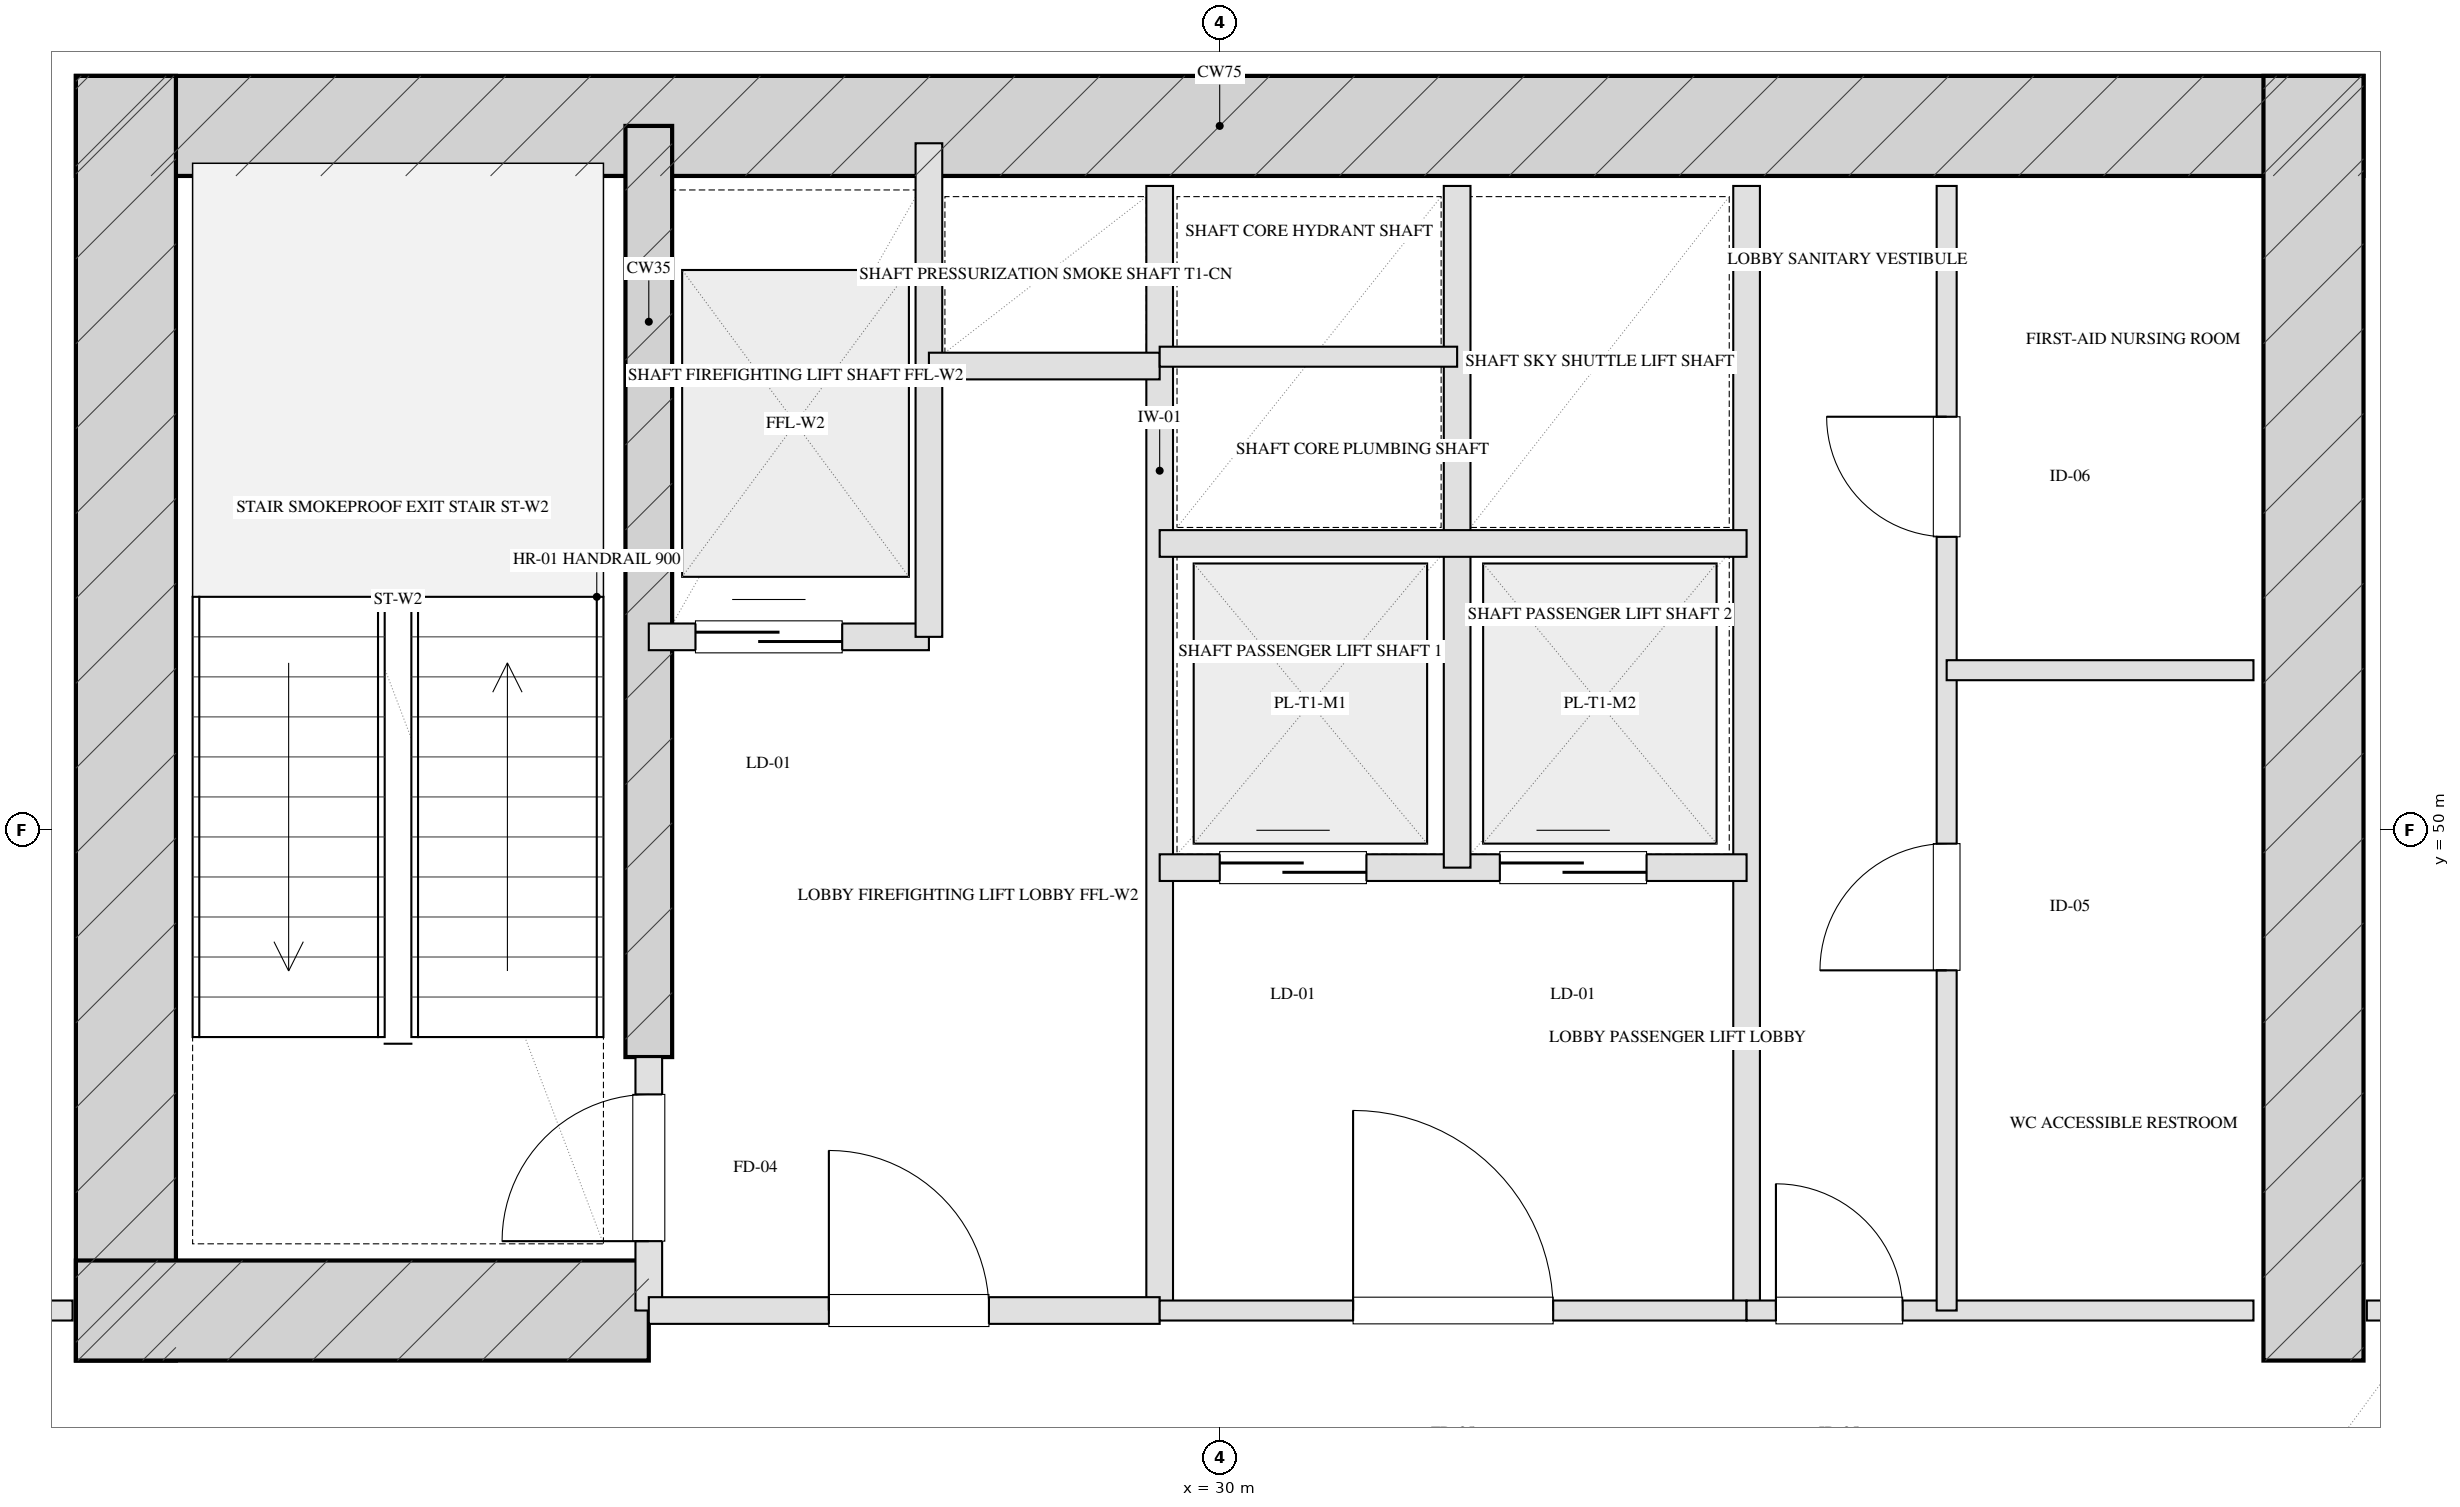
"""IFC4 building model, lengths in metres.
Left out: names, types, materials, properties, quantities, classifications, styles, units other than length and angle.
Written with IfcOpenShell. Run it as: python <this file> out.ifc"""

import sys

from ifc_helpers import new_model, si_unit, direction, frame, frame_2d, origin, place, context, subcontext, project, spatial, rectangle, extrude, element, fill, save


model = new_model("IFC4")
c1 = context("Model", 3, precision=1e-05, world=origin(), true_north=direction((0.0, 1.0)))
c2 = subcontext(c1, "Body", "Model", "MODEL_VIEW")
j1 = project(units=[si_unit("LENGTHUNIT", "METRE"), si_unit("PLANEANGLEUNIT", "RADIAN")], contexts=[c1])
p1 = place(None, origin())
s1 = spatial("IfcSite", under=j1, at=p1, CompositionType="ELEMENT")
p2 = place(p1, origin())
s2 = spatial("IfcBuilding", under=s1, at=p2, CompositionType="ELEMENT")
p3 = place(p2, frame((0.0, 0.0, 26.0)))
s3 = spatial("IfcBuildingStorey", under=s2, at=p3, CompositionType="ELEMENT", Elevation=26.0)
p4 = place(p3, frame((21.425, 55.28, 0.0), z_axis=(0.0, 0.0, 1.0), x_axis=(1.0, 0.0, 0.0)))
e1 = element("IfcWall", 1, at=p4, inside=s3, PredefinedType="SHEAR", context=c2, shape_type="SweptSolid", body=[
    extrude(rectangle(XDim=17.15, YDim=0.75, at=frame_2d((8.575, 0.0))), origin(), (0.0, 0.0, 1.0), 4.0),
])
for number, where, z_axis, x_axis in (
    (2, (21.8, 46.025, 0.0), (0.0, 0.0, 1.0), (0.0, 1.0, 0.0)),
    (3, (38.2, 46.025, 0.0), (0.0, 0.0, 1.0), (0.0, 1.0, 0.0)),
):
    element("IfcWall", number, at=place(p3, frame(where, z_axis=z_axis, x_axis=x_axis)), inside=s3, PredefinedType="SHEAR", context=c2, shape_type="SweptSolid", body=[
        extrude(rectangle(XDim=9.63, YDim=0.75, at=frame_2d((4.815, 0.0))), origin(), (0.0, 0.0, 1.0), 4.0),
    ])
p5 = place(p3, frame((25.72, 48.3, 0.0), z_axis=(0.0, 0.0, 1.0), x_axis=(0.0, 1.0, 0.0)))
e4 = element("IfcWall", 4, at=p5, inside=s3, PredefinedType="SHEAR", context=c2, shape_type="SweptSolid", body=[
    extrude(rectangle(XDim=6.98, YDim=0.35, at=frame_2d((3.49, 0.0))), origin(), (0.0, 0.0, 1.0), 4.0),
])
p6 = place(p3, frame((21.425, 46.4, 0.0), z_axis=(0.0, 0.0, 1.0), x_axis=(1.0, 0.0, 0.0)))
e5 = element("IfcWall", 5, at=p6, inside=s3, PredefinedType="SHEAR", context=c2, shape_type="SweptSolid", body=[
    extrude(rectangle(XDim=4.295, YDim=0.75, at=frame_2d((2.147, 0.0))), origin(), (0.0, 0.0, 1.0), 4.0),
])
p7 = place(p3, frame((25.72, 46.4, 0.0), z_axis=(0.0, 0.0, 1.0), x_axis=(0.0, 1.0, 0.0)))
e6 = element("IfcWall", 6, at=p7, inside=s3, PredefinedType="PARTITIONING", context=c2, shape_type="SweptSolid", body=[
    extrude(rectangle(XDim=1.9, YDim=0.2, at=frame_2d((0.95, 0.0))), origin(), (0.0, 0.0, 1.0), 3.725),
])
p8 = place(p7, frame((0.52, 0.0, 0.0)))
e7 = element("IfcOpeningElement", 7, at=p8, cuts=e6, PredefinedType="OPENING", context=c2, shape_type="SweptSolid", body=[
    extrude(rectangle(XDim=1.1, YDim=2.05, at=frame_2d((0.55, 1.025))), frame((0.0, 0.11, 0.0), z_axis=(0.0, -1.0, 0.0), x_axis=(1.0, 0.0, 0.0)), (0.0, 0.0, 1.0), 0.22),
])
p9 = place(p3, frame((29.55, 46.4, 0.0), z_axis=(0.0, 0.0, 1.0), x_axis=(0.0, 1.0, 0.0)))
e8 = element("IfcWall", 8, at=p9, inside=s3, PredefinedType="PARTITIONING", context=c2, shape_type="SweptSolid", body=[
    extrude(rectangle(XDim=8.43, YDim=0.2, at=frame_2d((4.215, 0.0))), origin(), (0.0, 0.0, 1.0), 3.725),
])
p10 = place(p3, frame((25.72, 46.4, 0.0), z_axis=(0.0, 0.0, 1.0), x_axis=(1.0, 0.0, 0.0)))
e9 = element("IfcWall", 9, at=p10, inside=s3, PredefinedType="PARTITIONING", context=c2, shape_type="SweptSolid", body=[
    extrude(rectangle(XDim=3.83, YDim=0.2, at=frame_2d((1.915, 0.0))), origin(), (0.0, 0.0, 1.0), 3.725),
])
p11 = place(p10, frame((1.35, 0.0, 0.0)))
e10 = element("IfcOpeningElement", 10, at=p11, cuts=e9, PredefinedType="OPENING", context=c2, shape_type="SweptSolid", body=[
    extrude(rectangle(XDim=1.2, YDim=2.05, at=frame_2d((0.6, 1.025))), frame((0.0, 0.11, 0.0), z_axis=(0.0, -1.0, 0.0), x_axis=(1.0, 0.0, 0.0)), (0.0, 0.0, 1.0), 0.22),
])
p12 = place(p3, frame((25.72, 51.45, 0.0), z_axis=(0.0, 0.0, 1.0), x_axis=(1.0, 0.0, 0.0)))
e11 = element("IfcWall", 11, at=p12, inside=s3, PredefinedType="PARTITIONING", context=c2, shape_type="SweptSolid", body=[
    extrude(rectangle(XDim=2.1, YDim=0.2, at=frame_2d((1.05, 0.0))), origin(), (0.0, 0.0, 1.0), 3.725),
])
p13 = place(p12, frame((0.35, 0.0, 0.0)))
e12 = element("IfcOpeningElement", 12, at=p13, cuts=e11, PredefinedType="OPENING", context=c2, shape_type="SweptSolid", body=[
    extrude(rectangle(XDim=1.1, YDim=2.05, at=frame_2d((0.55, 1.025))), frame((0.0, 0.11, 0.0), z_axis=(0.0, -1.0, 0.0), x_axis=(1.0, 0.0, 0.0)), (0.0, 0.0, 1.0), 0.22),
])
p14 = place(p3, frame((27.82, 51.45, 0.0), z_axis=(0.0, 0.0, 1.0), x_axis=(0.0, 1.0, 0.0)))
e13 = element("IfcWall", 13, at=p14, inside=s3, PredefinedType="PARTITIONING", context=c2, shape_type="SweptSolid", body=[
    extrude(rectangle(XDim=3.7, YDim=0.2, at=frame_2d((1.85, 0.0))), origin(), (0.0, 0.0, 1.0), 3.725),
])
p15 = place(p3, frame((27.82, 53.48, 0.0), z_axis=(0.0, 0.0, 1.0), x_axis=(1.0, 0.0, 0.0)))
e14 = element("IfcWall", 14, at=p15, inside=s3, PredefinedType="PARTITIONING", context=c2, shape_type="SweptSolid", body=[
    extrude(rectangle(XDim=1.73, YDim=0.2, at=frame_2d((0.865, 0.0))), origin(), (0.0, 0.0, 1.0), 3.725),
])
p16 = place(p3, frame((33.95, 46.4, 0.0), z_axis=(0.0, 0.0, 1.0), x_axis=(0.0, 1.0, 0.0)))
e15 = element("IfcWall", 15, at=p16, inside=s3, PredefinedType="PARTITIONING", context=c2, shape_type="SweptSolid", body=[
    extrude(rectangle(XDim=8.43, YDim=0.2, at=frame_2d((4.215, 0.0))), origin(), (0.0, 0.0, 1.0), 3.725),
])
p17 = place(p3, frame((29.55, 46.4, 0.0), z_axis=(0.0, 0.0, 1.0), x_axis=(1.0, 0.0, 0.0)))
e16 = element("IfcWall", 16, at=p17, inside=s3, PredefinedType="PARTITIONING", context=c2, shape_type="SweptSolid", body=[
    extrude(rectangle(XDim=4.4, YDim=0.15, at=frame_2d((2.2, 0.0))), origin(), (0.0, 0.0, 1.0), 3.725),
])
p18 = place(p17, frame((1.45, 0.0, 0.0)))
e17 = element("IfcOpeningElement", 17, at=p18, cuts=e16, PredefinedType="OPENING", context=c2, shape_type="SweptSolid", body=[
    extrude(rectangle(XDim=1.5, YDim=2.05, at=frame_2d((0.75, 1.025))), frame((0.0, 0.085, 0.0), z_axis=(0.0, -1.0, 0.0), x_axis=(1.0, 0.0, 0.0)), (0.0, 0.0, 1.0), 0.17),
])
p19 = place(p3, frame((29.55, 49.72, 0.0), z_axis=(0.0, 0.0, 1.0), x_axis=(1.0, 0.0, 0.0)))
e18 = element("IfcWall", 18, at=p19, inside=s3, PredefinedType="PARTITIONING", context=c2, shape_type="SweptSolid", body=[
    extrude(rectangle(XDim=4.4, YDim=0.2, at=frame_2d((2.2, 0.0))), origin(), (0.0, 0.0, 1.0), 3.725),
])
p20 = place(p19, frame((0.45, 0.0, 0.0)))
e19 = element("IfcOpeningElement", 19, at=p20, cuts=e18, PredefinedType="OPENING", context=c2, shape_type="SweptSolid", body=[
    extrude(rectangle(XDim=1.1, YDim=2.05, at=frame_2d((0.55, 1.025))), frame((0.0, 0.11, 0.0), z_axis=(0.0, -1.0, 0.0), x_axis=(1.0, 0.0, 0.0)), (0.0, 0.0, 1.0), 0.22),
])
p21 = place(p19, frame((2.55, 0.0, 0.0)))
e20 = element("IfcOpeningElement", 20, at=p21, cuts=e18, PredefinedType="OPENING", context=c2, shape_type="SweptSolid", body=[
    extrude(rectangle(XDim=1.1, YDim=2.05, at=frame_2d((0.55, 1.025))), frame((0.0, 0.11, 0.0), z_axis=(0.0, -1.0, 0.0), x_axis=(1.0, 0.0, 0.0)), (0.0, 0.0, 1.0), 0.22),
])
p22 = place(p3, frame((31.78, 49.72, 0.0), z_axis=(0.0, 0.0, 1.0), x_axis=(0.0, 1.0, 0.0)))
e21 = element("IfcWall", 21, at=p22, inside=s3, PredefinedType="PARTITIONING", context=c2, shape_type="SweptSolid", body=[
    extrude(rectangle(XDim=5.11, YDim=0.2, at=frame_2d((2.555, 0.0))), origin(), (0.0, 0.0, 1.0), 3.725),
])
p23 = place(p3, frame((29.55, 52.15, 0.0), z_axis=(0.0, 0.0, 1.0), x_axis=(1.0, 0.0, 0.0)))
e22 = element("IfcWall", 22, at=p23, inside=s3, PredefinedType="PARTITIONING", context=c2, shape_type="SweptSolid", body=[
    extrude(rectangle(XDim=4.4, YDim=0.2, at=frame_2d((2.2, 0.0))), origin(), (0.0, 0.0, 1.0), 3.725),
])
p24 = place(p3, frame((29.55, 53.55, 0.0), z_axis=(0.0, 0.0, 1.0), x_axis=(1.0, 0.0, 0.0)))
e23 = element("IfcWall", 23, at=p24, inside=s3, PredefinedType="PARTITIONING", context=c2, shape_type="SweptSolid", body=[
    extrude(rectangle(XDim=2.23, YDim=0.15, at=frame_2d((1.115, 0.0))), origin(), (0.0, 0.0, 1.0), 3.725),
])
p25 = place(p3, frame((33.95, 46.4, 0.0), z_axis=(0.0, 0.0, 1.0), x_axis=(1.0, 0.0, 0.0)))
e24 = element("IfcWall", 24, at=p25, inside=s3, PredefinedType="PARTITIONING", context=c2, shape_type="SweptSolid", body=[
    extrude(rectangle(XDim=3.8, YDim=0.15, at=frame_2d((1.9, 0.0))), origin(), (0.0, 0.0, 1.0), 3.725),
])
p26 = place(p25, frame((0.22, 0.0, 0.0)))
e25 = element("IfcOpeningElement", 25, at=p26, cuts=e24, PredefinedType="OPENING", context=c2, shape_type="SweptSolid", body=[
    extrude(rectangle(XDim=0.95, YDim=2.05, at=frame_2d((0.475, 1.025))), frame((0.0, 0.085, 0.0), z_axis=(0.0, -1.0, 0.0), x_axis=(1.0, 0.0, 0.0)), (0.0, 0.0, 1.0), 0.17),
])
p27 = place(p3, frame((35.45, 46.4, 0.0), z_axis=(0.0, 0.0, 1.0), x_axis=(0.0, 1.0, 0.0)))
e26 = element("IfcWall", 26, at=p27, inside=s3, PredefinedType="PARTITIONING", context=c2, shape_type="SweptSolid", body=[
    extrude(rectangle(XDim=8.43, YDim=0.15, at=frame_2d((4.215, 0.0))), origin(), (0.0, 0.0, 1.0), 3.365),
])
p28 = place(p27, frame((2.55, 0.0, 0.0)))
e27 = element("IfcOpeningElement", 27, at=p28, cuts=e26, PredefinedType="OPENING", context=c2, shape_type="SweptSolid", body=[
    extrude(rectangle(XDim=0.95, YDim=2.05, at=frame_2d((0.475, 1.025))), frame((0.0, 0.085, 0.0), z_axis=(0.0, -1.0, 0.0), x_axis=(1.0, 0.0, 0.0)), (0.0, 0.0, 1.0), 0.17),
])
p29 = place(p27, frame((5.8, 0.0, 0.0)))
e28 = element("IfcOpeningElement", 28, at=p29, cuts=e26, PredefinedType="OPENING", context=c2, shape_type="SweptSolid", body=[
    extrude(rectangle(XDim=0.9, YDim=2.05, at=frame_2d((0.45, 1.025))), frame((0.0, 0.085, 0.0), z_axis=(0.0, -1.0, 0.0), x_axis=(1.0, 0.0, 0.0)), (0.0, 0.0, 1.0), 0.17),
])
p30 = place(p3, frame((35.45, 51.2, 0.0), z_axis=(0.0, 0.0, 1.0), x_axis=(1.0, 0.0, 0.0)))
e29 = element("IfcWall", 29, at=p30, inside=s3, PredefinedType="PARTITIONING", context=c2, shape_type="SweptSolid", body=[
    extrude(rectangle(XDim=2.3, YDim=0.15, at=frame_2d((1.15, 0.0))), origin(), (0.0, 0.0, 1.0), 3.725),
])
p31 = place(p3, frame((10.6, 46.4, 0.0), z_axis=(0.0, 0.0, 1.0), x_axis=(1.0, 0.0, 0.0)))
e30 = element("IfcWall", 30, at=p31, inside=s3, PredefinedType="PARTITIONING", context=c2, shape_type="SweptSolid", body=[
    extrude(rectangle(XDim=10.8, YDim=0.15, at=frame_2d((5.4, 0.0))), origin(), (0.0, 0.0, 1.0), 3.725),
])
p32 = place(p31, frame((4.536, 0.0, 0.0)))
e31 = element("IfcOpeningElement", 31, at=p32, cuts=e30, PredefinedType="OPENING", context=c2, shape_type="SweptSolid", body=[
    extrude(rectangle(XDim=1.0, YDim=2.05, at=frame_2d((0.5, 1.025))), frame((0.0, 0.085, 0.0), z_axis=(0.0, -1.0, 0.0), x_axis=(1.0, 0.0, 0.0)), (0.0, 0.0, 1.0), 0.17),
])
p33 = place(p3, frame((38.6, 46.4, 0.0), z_axis=(0.0, 0.0, 1.0), x_axis=(1.0, 0.0, 0.0)))
e32 = element("IfcWall", 32, at=p33, inside=s3, PredefinedType="PARTITIONING", context=c2, shape_type="SweptSolid", body=[
    extrude(rectangle(XDim=10.8, YDim=0.15, at=frame_2d((5.4, 0.0))), origin(), (0.0, 0.0, 1.0), 3.725),
])
p34 = place(p33, frame((4.536, 0.0, 0.0)))
e33 = element("IfcOpeningElement", 33, at=p34, cuts=e32, PredefinedType="OPENING", context=c2, shape_type="SweptSolid", body=[
    extrude(rectangle(XDim=1.05, YDim=2.05, at=frame_2d((0.525, 1.025))), frame((0.0, 0.085, 0.0), z_axis=(0.0, -1.0, 0.0), x_axis=(1.0, 0.0, 0.0)), (0.0, 0.0, 1.0), 0.17),
])
p35 = place(p8, origin())
e34 = element("IfcDoor", 34, at=p35, inside=s3, OperationType="SINGLE_SWING_LEFT", PredefinedType="DOOR", context=c2, shape_type="SweptSolid", body=[
    extrude(rectangle(XDim=1.1, YDim=2.05, at=frame_2d((0.55, 1.025))), frame((0.0, 0.025, 0.0), z_axis=(0.0, -1.0, 0.0), x_axis=(1.0, 0.0, 0.0)), (0.0, 0.0, 1.0), 0.05),
])
fill(e7, e34)
p36 = place(p11, origin())
e35 = element("IfcDoor", 35, at=p36, inside=s3, OperationType="SINGLE_SWING_LEFT", PredefinedType="DOOR", context=c2, shape_type="SweptSolid", body=[
    extrude(rectangle(XDim=1.2, YDim=2.05, at=frame_2d((0.6, 1.025))), frame((0.0, 0.025, 0.0), z_axis=(0.0, -1.0, 0.0), x_axis=(1.0, 0.0, 0.0)), (0.0, 0.0, 1.0), 0.05),
])
fill(e10, e35)
p37 = place(p13, origin())
e36 = element("IfcDoor", 36, at=p37, inside=s3, OperationType="DOUBLE_DOOR_SLIDING", PredefinedType="DOOR", context=c2, shape_type="SweptSolid", body=[
    extrude(rectangle(XDim=1.1, YDim=2.05, at=frame_2d((0.55, 1.025))), frame((0.0, 0.025, 0.0), z_axis=(0.0, -1.0, 0.0), x_axis=(1.0, 0.0, 0.0)), (0.0, 0.0, 1.0), 0.05),
])
fill(e12, e36)
p38 = place(p18, origin())
e37 = element("IfcDoor", 37, at=p38, inside=s3, OperationType="SINGLE_SWING_LEFT", PredefinedType="DOOR", context=c2, shape_type="SweptSolid", body=[
    extrude(rectangle(XDim=1.5, YDim=2.05, at=frame_2d((0.75, 1.025))), frame((0.0, 0.025, 0.0), z_axis=(0.0, -1.0, 0.0), x_axis=(1.0, 0.0, 0.0)), (0.0, 0.0, 1.0), 0.05),
])
fill(e17, e37)
p39 = place(p20, origin())
e38 = element("IfcDoor", 38, at=p39, inside=s3, OperationType="DOUBLE_DOOR_SLIDING", PredefinedType="DOOR", context=c2, shape_type="SweptSolid", body=[
    extrude(rectangle(XDim=1.1, YDim=2.05, at=frame_2d((0.55, 1.025))), frame((0.0, 0.025, 0.0), z_axis=(0.0, -1.0, 0.0), x_axis=(1.0, 0.0, 0.0)), (0.0, 0.0, 1.0), 0.05),
])
fill(e19, e38)
p40 = place(p21, origin())
e39 = element("IfcDoor", 39, at=p40, inside=s3, OperationType="DOUBLE_DOOR_SLIDING", PredefinedType="DOOR", context=c2, shape_type="SweptSolid", body=[
    extrude(rectangle(XDim=1.1, YDim=2.05, at=frame_2d((0.55, 1.025))), frame((0.0, 0.025, 0.0), z_axis=(0.0, -1.0, 0.0), x_axis=(1.0, 0.0, 0.0)), (0.0, 0.0, 1.0), 0.05),
])
fill(e20, e39)
p41 = place(p26, origin())
e40 = element("IfcDoor", 40, at=p41, inside=s3, OperationType="SINGLE_SWING_LEFT", PredefinedType="DOOR", context=c2, shape_type="SweptSolid", body=[
    extrude(rectangle(XDim=0.95, YDim=2.05, at=frame_2d((0.475, 1.025))), frame((0.0, 0.025, 0.0), z_axis=(0.0, -1.0, 0.0), x_axis=(1.0, 0.0, 0.0)), (0.0, 0.0, 1.0), 0.05),
])
fill(e25, e40)
p42 = place(p28, origin())
e41 = element("IfcDoor", 41, at=p42, inside=s3, OperationType="SINGLE_SWING_LEFT", PredefinedType="DOOR", context=c2, shape_type="SweptSolid", body=[
    extrude(rectangle(XDim=0.95, YDim=2.05, at=frame_2d((0.475, 1.025))), frame((0.0, 0.025, 0.0), z_axis=(0.0, -1.0, 0.0), x_axis=(1.0, 0.0, 0.0)), (0.0, 0.0, 1.0), 0.05),
])
fill(e27, e41)
p43 = place(p29, origin())
e42 = element("IfcDoor", 42, at=p43, inside=s3, OperationType="SINGLE_SWING_RIGHT", PredefinedType="DOOR", context=c2, shape_type="SweptSolid", body=[
    extrude(rectangle(XDim=0.9, YDim=2.05, at=frame_2d((0.45, 1.025))), frame((0.0, 0.025, 0.0), z_axis=(0.0, -1.0, 0.0), x_axis=(1.0, 0.0, 0.0)), (0.0, 0.0, 1.0), 0.05),
])
fill(e28, e42)
save(model, sys.argv[1])
